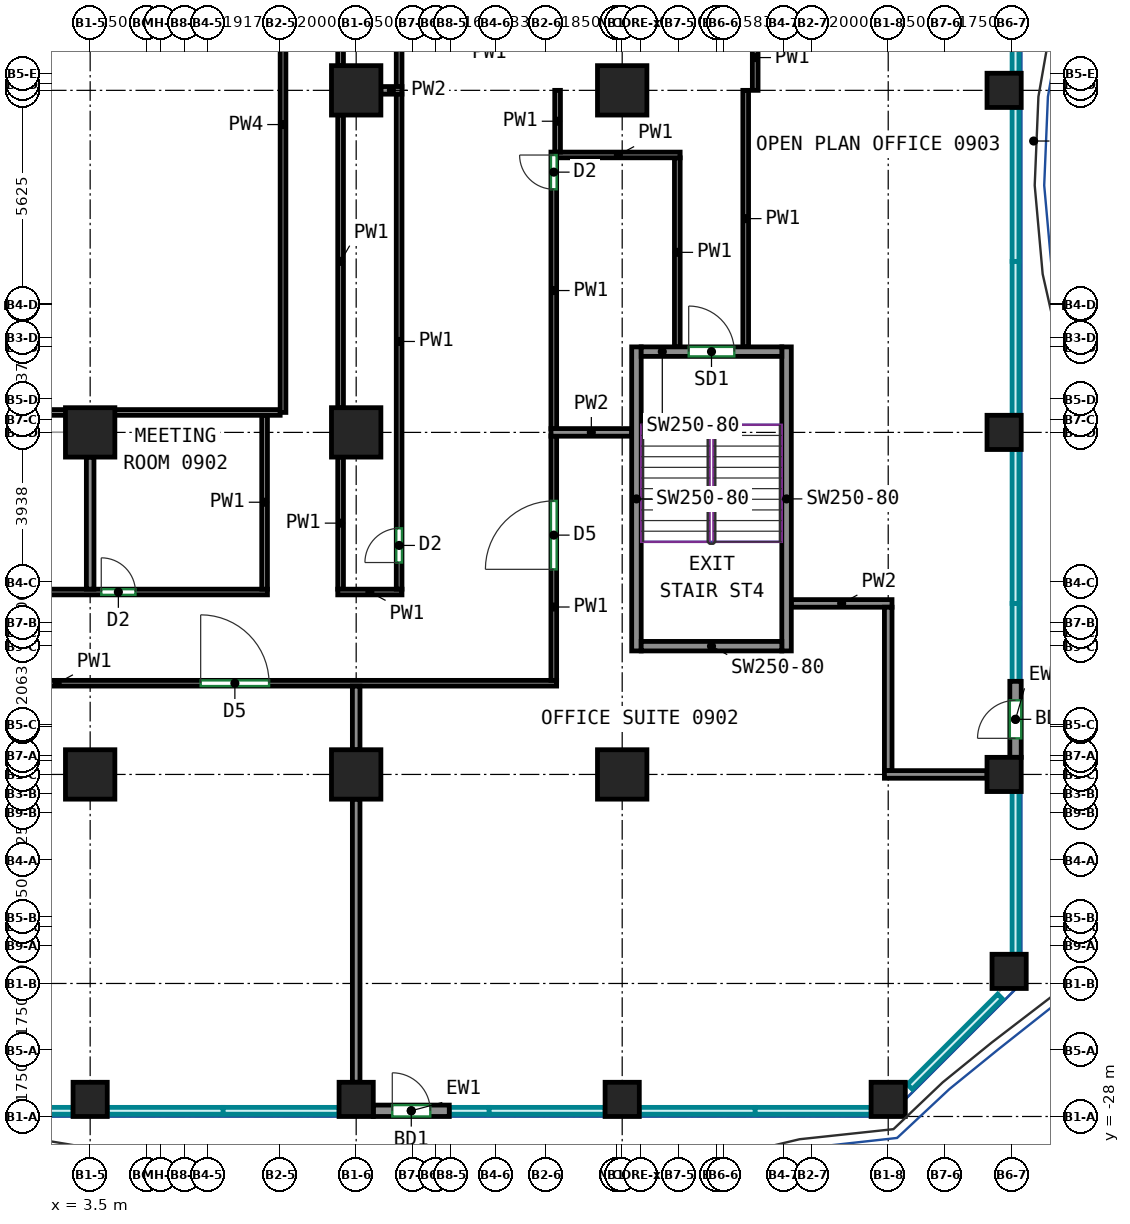
"""IFC4 building model, lengths in metres.
Left out: names, types, materials, properties, quantities, classifications, styles, units other than length and angle.
Written with IfcOpenShell. Run it as: python <this file> out.ifc"""

import sys

from ifc_helpers import new_model, si_unit, direction, frame, frame_2d, origin, origin_2d, place, context, subcontext, project, spatial, rectangle, extrude, source, transform, mapped, element, fill, save


model = new_model("IFC4")
c1 = context("Model", 3, precision=1e-05, world=origin(), true_north=direction((0.0, 1.0)))
c2 = subcontext(c1, "Body", "Model", "MODEL_VIEW")
j1 = project(units=[si_unit("LENGTHUNIT", "METRE"), si_unit("PLANEANGLEUNIT", "RADIAN")], contexts=[c1])
p1 = place(None, origin())
s1 = spatial("IfcSite", under=j1, at=p1, CompositionType="ELEMENT")
p2 = place(p1, origin())
s2 = spatial("IfcBuilding", under=s1, at=p2, CompositionType="ELEMENT")
p3 = place(p2, frame((0.0, 0.0, 43.0)))
s3 = spatial("IfcBuildingStorey", under=s2, at=p3, CompositionType="ELEMENT", Elevation=43.0)
m1 = source(origin(), c2, "Body", "SweptSolid", [
    extrude(rectangle(XDim=0.9, YDim=0.9, at=origin_2d()), origin(), (0.0, 0.0, 1.0), 3.72),
])
p4 = place(p3, frame((3.5, -27.55, 0.0), z_axis=(0.0, 0.0, 1.0), x_axis=(1.0, 0.0, 0.0)))
e1 = element("IfcColumn", 1, at=p4, inside=s3, PredefinedType="COLUMN", context=c2, shape_type="MappedRepresentation", body=[
    mapped(m1, transform((0.0, 0.0, 0.0))),
])
m2 = source(origin(), c2, "Body", "SweptSolid", [
    extrude(rectangle(XDim=1.3, YDim=1.3, at=origin_2d()), origin(), (0.0, 0.0, 1.0), 3.72),
])
for number, where, z_axis, x_axis in (
    (2, (3.5, -19.0, 0.0), (0.0, 0.0, 1.0), (1.0, 0.0, 0.0)),
    (3, (3.5, -10.0, 0.0), (0.0, 0.0, 1.0), (1.0, 0.0, 0.0)),
):
    element("IfcColumn", number, at=place(p3, frame(where, z_axis=z_axis, x_axis=x_axis)), inside=s3, PredefinedType="COLUMN", context=c2, shape_type="MappedRepresentation", body=[
        mapped(m2, transform((0.0, 0.0, 0.0))),
    ])
p5 = place(p3, frame((10.5, -27.55, 0.0), z_axis=(0.0, 0.0, 1.0), x_axis=(1.0, 0.0, 0.0)))
e4 = element("IfcColumn", 4, at=p5, inside=s3, PredefinedType="COLUMN", context=c2, shape_type="MappedRepresentation", body=[
    mapped(m1, transform((0.0, 0.0, 0.0))),
])
for number, where, z_axis, x_axis in (
    (5, (10.5, -19.0, 0.0), (0.0, 0.0, 1.0), (1.0, 0.0, 0.0)),
    (6, (10.5, -10.0, 0.0), (0.0, 0.0, 1.0), (1.0, 0.0, 0.0)),
    (7, (10.5, -1.0, 0.0), (0.0, 0.0, 1.0), (1.0, 0.0, 0.0)),
):
    element("IfcColumn", number, at=place(p3, frame(where, z_axis=z_axis, x_axis=x_axis)), inside=s3, PredefinedType="COLUMN", context=c2, shape_type="MappedRepresentation", body=[
        mapped(m2, transform((0.0, 0.0, 0.0))),
    ])
p6 = place(p3, frame((17.5, -27.55, 0.0), z_axis=(0.0, 0.0, 1.0), x_axis=(1.0, 0.0, 0.0)))
e8 = element("IfcColumn", 8, at=p6, inside=s3, PredefinedType="COLUMN", context=c2, shape_type="MappedRepresentation", body=[
    mapped(m1, transform((0.0, 0.0, 0.0))),
])
for number, where, z_axis, x_axis in (
    (9, (17.5, -19.0, 0.0), (0.0, 0.0, 1.0), (1.0, 0.0, 0.0)),
    (10, (17.5, -1.0, 0.0), (0.0, 0.0, 1.0), (1.0, 0.0, 0.0)),
):
    element("IfcColumn", number, at=place(p3, frame(where, z_axis=z_axis, x_axis=x_axis)), inside=s3, PredefinedType="COLUMN", context=c2, shape_type="MappedRepresentation", body=[
        mapped(m2, transform((0.0, 0.0, 0.0))),
    ])
for number, where, z_axis, x_axis in (
    (11, (24.5, -27.55, 0.0), (0.0, 0.0, 1.0), (1.0, 0.0, 0.0)),
    (12, (27.55, -19.0, 0.0), (0.0, 0.0, 1.0), (1.0, 0.0, 0.0)),
    (13, (27.55, -10.0, 0.0), (0.0, 0.0, 1.0), (1.0, 0.0, 0.0)),
    (14, (27.55, -1.0, 0.0), (0.0, 0.0, 1.0), (1.0, 0.0, 0.0)),
    (15, (27.682, -24.182, 0.0), (0.0, 0.0, 1.0), (1.0, 0.0, 0.0)),
):
    element("IfcColumn", number, at=place(p3, frame(where, z_axis=z_axis, x_axis=x_axis)), inside=s3, PredefinedType="COLUMN", context=c2, shape_type="MappedRepresentation", body=[
        mapped(m1, transform((0.0, 0.0, 0.0))),
    ])
m3 = source(origin(), c2, "Body", "SweptSolid", [
    extrude(rectangle(XDim=8.0, YDim=0.25, at=frame_2d((4.0, 0.0))), origin(), (0.0, 0.0, 1.0), 3.72),
])
for number, where, z_axis, x_axis in (
    (16, (17.875, -15.75, 0.0), (0.0, 0.0, 1.0), (0.0, 1.0, 0.0)),
    (17, (21.825, -15.75, 0.0), (0.0, 0.0, 1.0), (0.0, 1.0, 0.0)),
):
    element("IfcWall", number, at=place(p3, frame(where, z_axis=z_axis, x_axis=x_axis)), inside=s3, PredefinedType="SHEAR", context=c2, shape_type="MappedRepresentation", body=[
        mapped(m3, transform((0.0, 0.0, 0.0))),
    ])
m4 = source(origin(), c2, "Body", "SweptSolid", [
    extrude(rectangle(XDim=3.7, YDim=0.25, at=frame_2d((1.85, 0.0))), origin(), (0.0, 0.0, 1.0), 3.72),
])
p7 = place(p3, frame((18.0, -15.625, 0.0), z_axis=(0.0, 0.0, 1.0), x_axis=(1.0, 0.0, 0.0)))
e18 = element("IfcWall", 18, at=p7, inside=s3, PredefinedType="SHEAR", context=c2, shape_type="MappedRepresentation", body=[
    mapped(m4, transform((0.0, 0.0, 0.0))),
])
p8 = place(p3, frame((18.0, -7.875, 0.0), z_axis=(0.0, 0.0, 1.0), x_axis=(1.0, 0.0, 0.0)))
e19 = element("IfcWall", 19, at=p8, inside=s3, PredefinedType="SHEAR", context=c2, shape_type="MappedRepresentation", body=[
    mapped(m4, transform((0.0, 0.0, 0.0))),
])
p9 = place(p8, frame((1.25, 0.0, 0.0)))
e20 = element("IfcOpeningElement", 20, at=p9, cuts=e19, PredefinedType="OPENING", context=c2, shape_type="SweptSolid", body=[
    extrude(rectangle(XDim=1.2, YDim=2.1, at=frame_2d((0.6, 1.05))), frame((0.0, 0.135, 0.0), z_axis=(0.0, -1.0, 0.0), x_axis=(1.0, 0.0, 0.0)), (0.0, 0.0, 1.0), 0.27),
])
m5 = source(origin(), c2, "Body", "SweptSolid", [
    extrude(rectangle(XDim=2.0, YDim=0.3, at=frame_2d((1.0, 0.0))), origin(), (0.0, 0.0, 1.0), 3.72),
])
p10 = place(p3, frame((10.95, -27.85, 0.0), z_axis=(0.0, 0.0, 1.0), x_axis=(1.0, 0.0, 0.0)))
e21 = element("IfcWall", 21, at=p10, inside=s3, PredefinedType="SOLIDWALL", context=c2, shape_type="MappedRepresentation", body=[
    mapped(m5, transform((0.0, 0.0, 0.0))),
])
p11 = place(p10, frame((0.5, 0.0, 0.0)))
e22 = element("IfcOpeningElement", 22, at=p11, cuts=e21, PredefinedType="OPENING", context=c2, shape_type="SweptSolid", body=[
    extrude(rectangle(XDim=1.0, YDim=2.1, at=frame_2d((0.5, 1.05))), frame((0.0, 0.16, 0.0), z_axis=(0.0, -1.0, 0.0), x_axis=(1.0, 0.0, 0.0)), (0.0, 0.0, 1.0), 0.32),
])
p12 = place(p3, frame((27.85, -18.55, 0.0), z_axis=(0.0, 0.0, 1.0), x_axis=(0.0, 1.0, 0.0)))
e23 = element("IfcWall", 23, at=p12, inside=s3, PredefinedType="SOLIDWALL", context=c2, shape_type="MappedRepresentation", body=[
    mapped(m5, transform((0.0, 0.0, 0.0))),
])
p13 = place(p12, frame((0.5, 0.0, 0.0)))
e24 = element("IfcOpeningElement", 24, at=p13, cuts=e23, PredefinedType="OPENING", context=c2, shape_type="SweptSolid", body=[
    extrude(rectangle(XDim=1.0, YDim=2.1, at=frame_2d((0.5, 1.05))), frame((0.0, 0.16, 0.0), z_axis=(0.0, -1.0, 0.0), x_axis=(1.0, 0.0, 0.0)), (0.0, 0.0, 1.0), 0.32),
])
p14 = place(p3, frame((-7.805, -14.2, 0.0), z_axis=(0.0, 0.0, 1.0), x_axis=(1.0, 0.0, 0.0)))
e25 = element("IfcWall", 25, at=p14, inside=s3, PredefinedType="PARTITIONING", context=c2, shape_type="SweptSolid", body=[
    extrude(rectangle(XDim=15.97, YDim=0.15, at=frame_2d((7.985, 0.0))), origin(), (0.0, 0.0, 1.0), 3.72),
])
p15 = place(p14, frame((11.597, 0.0, 0.0)))
e26 = element("IfcOpeningElement", 26, at=p15, cuts=e25, PredefinedType="OPENING", context=c2, shape_type="SweptSolid", body=[
    extrude(rectangle(XDim=0.9, YDim=2.1, at=frame_2d((0.45, 1.05))), frame((0.0, 0.085, 0.0), z_axis=(0.0, -1.0, 0.0), x_axis=(1.0, 0.0, 0.0)), (0.0, 0.0, 1.0), 0.17),
])
p16 = place(p3, frame((8.09, -14.125, 0.0), z_axis=(0.0, 0.0, 1.0), x_axis=(0.0, 1.0, 0.0)))
e27 = element("IfcWall", 27, at=p16, inside=s3, PredefinedType="PARTITIONING", context=c2, shape_type="SweptSolid", body=[
    extrude(rectangle(XDim=4.575, YDim=0.15, at=frame_2d((2.288, 0.0))), origin(), (0.0, 0.0, 1.0), 3.72),
])
p17 = place(p3, frame((10.09, -9.35, 0.0), z_axis=(0.0, 0.0, 1.0), x_axis=(0.0, 1.0, 0.0)))
e28 = element("IfcWall", 28, at=p17, inside=s3, PredefinedType="PARTITIONING", context=c2, shape_type="SweptSolid", body=[
    extrude(rectangle(XDim=7.7, YDim=0.15, at=frame_2d((3.85, 0.0))), origin(), (0.0, 0.0, 1.0), 3.72),
])
p18 = place(p3, frame((10.09, -14.125, 0.0), z_axis=(0.0, 0.0, 1.0), x_axis=(0.0, 1.0, 0.0)))
e29 = element("IfcWall", 29, at=p18, inside=s3, PredefinedType="PARTITIONING", context=c2, shape_type="SweptSolid", body=[
    extrude(rectangle(XDim=3.475, YDim=0.15, at=frame_2d((1.738, 0.0))), origin(), (0.0, 0.0, 1.0), 3.72),
])
p19 = place(p3, frame((10.015, -14.2, 0.0), z_axis=(0.0, 0.0, 1.0), x_axis=(1.0, 0.0, 0.0)))
e30 = element("IfcWall", 30, at=p19, inside=s3, PredefinedType="PARTITIONING", context=c2, shape_type="SweptSolid", body=[
    extrude(rectangle(XDim=1.69, YDim=0.15, at=frame_2d((0.845, 0.0))), origin(), (0.0, 0.0, 1.0), 3.72),
])
p20 = place(p3, frame((11.63, -14.125, 0.0), z_axis=(0.0, 0.0, 1.0), x_axis=(0.0, 1.0, 0.0)))
e31 = element("IfcWall", 31, at=p20, inside=s3, PredefinedType="PARTITIONING", context=c2, shape_type="SweptSolid", body=[
    extrude(rectangle(XDim=13.035, YDim=0.15, at=frame_2d((6.518, 0.0))), origin(), (0.0, 0.0, 1.0), 3.72),
])
p21 = place(p20, frame((0.701, 0.0, 0.0)))
e32 = element("IfcOpeningElement", 32, at=p21, cuts=e31, PredefinedType="OPENING", context=c2, shape_type="SweptSolid", body=[
    extrude(rectangle(XDim=0.9, YDim=2.1, at=frame_2d((0.45, 1.05))), frame((0.0, 0.085, 0.0), z_axis=(0.0, -1.0, 0.0), x_axis=(1.0, 0.0, 0.0)), (0.0, 0.0, 1.0), 0.17),
])
p22 = place(p3, frame((10.09, -0.35, 0.0), z_axis=(0.0, 0.0, 1.0), x_axis=(0.0, 1.0, 0.0)))
e33 = element("IfcWall", 33, at=p22, inside=s3, PredefinedType="PARTITIONING", context=c2, shape_type="SweptSolid", body=[
    extrude(rectangle(XDim=8.35, YDim=0.15, at=frame_2d((4.175, 0.0))), origin(), (0.0, 0.0, 1.0), 3.72),
])
p23 = place(p22, frame((4.329, 0.0, 0.0)))
e34 = element("IfcOpeningElement", 34, at=p23, cuts=e33, PredefinedType="OPENING", context=c2, shape_type="SweptSolid", body=[
    extrude(rectangle(XDim=0.9, YDim=2.1, at=frame_2d((0.45, 1.05))), frame((0.0, 0.085, 0.0), z_axis=(0.0, -1.0, 0.0), x_axis=(1.0, 0.0, 0.0)), (0.0, 0.0, 1.0), 0.17),
])
p24 = place(p3, frame((11.63, -0.91, 0.0), z_axis=(0.0, 0.0, 1.0), x_axis=(0.0, 1.0, 0.0)))
e35 = element("IfcWall", 35, at=p24, inside=s3, PredefinedType="PARTITIONING", context=c2, shape_type="SweptSolid", body=[
    extrude(rectangle(XDim=6.26, YDim=0.15, at=frame_2d((3.13, 0.0))), origin(), (0.0, 0.0, 1.0), 3.72),
])
p25 = place(p3, frame((-10.51, -16.6, 0.0), z_axis=(0.0, 0.0, 1.0), x_axis=(1.0, 0.0, 0.0)))
e36 = element("IfcWall", 36, at=p25, inside=s3, PredefinedType="PARTITIONING", context=c2, shape_type="SweptSolid", body=[
    extrude(rectangle(XDim=26.285, YDim=0.15, at=frame_2d((13.143, 0.0))), origin(), (0.0, 0.0, 1.0), 3.72),
])
p26 = place(p25, frame((16.918, 0.0, 0.0)))
e37 = element("IfcOpeningElement", 37, at=p26, cuts=e36, PredefinedType="OPENING", context=c2, shape_type="SweptSolid", body=[
    extrude(rectangle(XDim=1.8, YDim=2.1, at=frame_2d((0.9, 1.05))), frame((0.0, 0.085, 0.0), z_axis=(0.0, -1.0, 0.0), x_axis=(1.0, 0.0, 0.0)), (0.0, 0.0, 1.0), 0.17),
])
p27 = place(p3, frame((15.7, -16.525, 0.0), z_axis=(0.0, 0.0, 1.0), x_axis=(0.0, 1.0, 0.0)))
e38 = element("IfcWall", 38, at=p27, inside=s3, PredefinedType="PARTITIONING", context=c2, shape_type="SweptSolid", body=[
    extrude(rectangle(XDim=6.435, YDim=0.15, at=frame_2d((3.217, 0.0))), origin(), (0.0, 0.0, 1.0), 3.72),
])
p28 = place(p27, frame((2.922, 0.0, 0.0)))
e39 = element("IfcOpeningElement", 39, at=p28, cuts=e38, PredefinedType="OPENING", context=c2, shape_type="SweptSolid", body=[
    extrude(rectangle(XDim=1.8, YDim=2.1, at=frame_2d((0.9, 1.05))), frame((0.0, 0.085, 0.0), z_axis=(0.0, -1.0, 0.0), x_axis=(1.0, 0.0, 0.0)), (0.0, 0.0, 1.0), 0.17),
])
p29 = place(p3, frame((18.95, -2.775, 0.0), z_axis=(0.0, 0.0, 1.0), x_axis=(0.0, -1.0, 0.0)))
e40 = element("IfcWall", 40, at=p29, inside=s3, PredefinedType="PARTITIONING", context=c2, shape_type="SweptSolid", body=[
    extrude(rectangle(XDim=4.975, YDim=0.15, at=frame_2d((2.488, 0.0))), origin(), (0.0, 0.0, 1.0), 3.72),
])
p30 = place(p3, frame((15.775, -2.7, 0.0), z_axis=(0.0, 0.0, 1.0), x_axis=(1.0, 0.0, 0.0)))
e41 = element("IfcWall", 41, at=p30, inside=s3, PredefinedType="PARTITIONING", context=c2, shape_type="SweptSolid", body=[
    extrude(rectangle(XDim=3.25, YDim=0.15, at=frame_2d((1.625, 0.0))), origin(), (0.0, 0.0, 1.0), 3.72),
])
p31 = place(p3, frame((15.8, -2.625, 0.0), z_axis=(0.0, 0.0, 1.0), x_axis=(0.0, 1.0, 0.0)))
e42 = element("IfcWall", 42, at=p31, inside=s3, PredefinedType="PARTITIONING", context=c2, shape_type="SweptSolid", body=[
    extrude(rectangle(XDim=1.625, YDim=0.15, at=frame_2d((0.812, 0.0))), origin(), (0.0, 0.0, 1.0), 3.72),
])
p32 = place(p3, frame((15.7, -9.91, 0.0), z_axis=(0.0, 0.0, 1.0), x_axis=(0.0, 1.0, 0.0)))
e43 = element("IfcWall", 43, at=p32, inside=s3, PredefinedType="PARTITIONING", context=c2, shape_type="SweptSolid", body=[
    extrude(rectangle(XDim=7.285, YDim=0.15, at=frame_2d((3.643, 0.0))), origin(), (0.0, 0.0, 1.0), 3.72),
])
p33 = place(p32, frame((6.308, 0.0, 0.0)))
e44 = element("IfcOpeningElement", 44, at=p33, cuts=e43, PredefinedType="OPENING", context=c2, shape_type="SweptSolid", body=[
    extrude(rectangle(XDim=0.9, YDim=2.1, at=frame_2d((0.45, 1.05))), frame((0.0, 0.085, 0.0), z_axis=(0.0, -1.0, 0.0), x_axis=(1.0, 0.0, 0.0)), (0.0, 0.0, 1.0), 0.17),
])
p34 = place(p3, frame((21.0, -1.0, 0.0), z_axis=(0.0, 0.0, 1.0), x_axis=(0.0, 1.0, 0.0)))
e45 = element("IfcWall", 45, at=p34, inside=s3, PredefinedType="PARTITIONING", context=c2, shape_type="SweptSolid", body=[
    extrude(rectangle(XDim=1.725, YDim=0.15, at=frame_2d((0.863, 0.0))), origin(), (0.0, 0.0, 1.0), 3.72),
])
p35 = place(p3, frame((20.75, -7.75, 0.0), z_axis=(0.0, 0.0, 1.0), x_axis=(0.0, 1.0, 0.0)))
e46 = element("IfcWall", 46, at=p35, inside=s3, PredefinedType="PARTITIONING", context=c2, shape_type="SweptSolid", body=[
    extrude(rectangle(XDim=6.75, YDim=0.15, at=frame_2d((3.375, 0.0))), origin(), (0.0, 0.0, 1.0), 3.72),
])
p36 = place(p3, frame((3.5, -14.124, 0.0), z_axis=(0.0, 0.0, 1.0), x_axis=(0.0, 1.0, 0.0)))
e47 = element("IfcWall", 47, at=p36, inside=s3, PredefinedType="PARTITIONING", context=c2, shape_type="SweptSolid", body=[
    extrude(rectangle(XDim=3.474, YDim=0.2, at=frame_2d((1.737, 0.0))), origin(), (0.0, 0.0, 1.0), 3.07),
])
p37 = place(p3, frame((11.15, -1.0, 0.0), z_axis=(0.0, 0.0, 1.0), x_axis=(1.0, 0.0, 0.0)))
e48 = element("IfcWall", 48, at=p37, inside=s3, PredefinedType="PARTITIONING", context=c2, shape_type="SweptSolid", body=[
    extrude(rectangle(XDim=0.554, YDim=0.2, at=frame_2d((0.277, 0.0))), origin(), (0.0, 0.0, 1.0), 3.72),
])
p38 = place(p3, frame((10.5, -18.35, 0.0), z_axis=(0.0, 0.0, 1.0), x_axis=(0.0, 1.0, 0.0)))
e49 = element("IfcWall", 49, at=p38, inside=s3, PredefinedType="PARTITIONING", context=c2, shape_type="SweptSolid", body=[
    extrude(rectangle(XDim=1.674, YDim=0.2, at=frame_2d((0.837, 0.0))), origin(), (0.0, 0.0, 1.0), 3.07),
])
p39 = place(p3, frame((10.5, -27.1, 0.0), z_axis=(0.0, 0.0, 1.0), x_axis=(0.0, 1.0, 0.0)))
e50 = element("IfcWall", 50, at=p39, inside=s3, PredefinedType="PARTITIONING", context=c2, shape_type="SweptSolid", body=[
    extrude(rectangle(XDim=7.45, YDim=0.2, at=frame_2d((3.725, 0.0))), origin(), (0.0, 0.0, 1.0), 3.07),
])
p40 = place(p3, frame((17.75, -10.0, 0.0), z_axis=(0.0, 0.0, 1.0), x_axis=(-1.0, 0.0, 0.0)))
e51 = element("IfcWall", 51, at=p40, inside=s3, PredefinedType="PARTITIONING", context=c2, shape_type="SweptSolid", body=[
    extrude(rectangle(XDim=2.124, YDim=0.2, at=frame_2d((1.062, 0.0))), origin(), (0.0, 0.0, 1.0), 3.72),
])
p41 = place(p3, frame((24.6, -14.5, 0.0), z_axis=(0.0, 0.0, 1.0), x_axis=(-1.0, 0.0, 0.0)))
e52 = element("IfcWall", 52, at=p41, inside=s3, PredefinedType="PARTITIONING", context=c2, shape_type="SweptSolid", body=[
    extrude(rectangle(XDim=2.65, YDim=0.2, at=frame_2d((1.325, 0.0))), origin(), (0.0, 0.0, 1.0), 3.72),
])
p42 = place(p3, frame((24.5, -18.9, 0.0), z_axis=(0.0, 0.0, 1.0), x_axis=(0.0, 1.0, 0.0)))
e53 = element("IfcWall", 53, at=p42, inside=s3, PredefinedType="PARTITIONING", context=c2, shape_type="SweptSolid", body=[
    extrude(rectangle(XDim=4.3, YDim=0.2, at=frame_2d((2.15, 0.0))), origin(), (0.0, 0.0, 1.0), 3.07),
])
p43 = place(p3, frame((27.1, -19.0, 0.0), z_axis=(0.0, 0.0, 1.0), x_axis=(-1.0, 0.0, 0.0)))
e54 = element("IfcWall", 54, at=p43, inside=s3, PredefinedType="PARTITIONING", context=c2, shape_type="SweptSolid", body=[
    extrude(rectangle(XDim=2.7, YDim=0.2, at=frame_2d((1.35, 0.0))), origin(), (0.0, 0.0, 1.0), 3.07),
])
p44 = place(p3, frame((8.5, -9.475, 0.0), z_axis=(0.0, 0.0, 1.0), x_axis=(-1.0, 0.0, 0.0)))
e55 = element("IfcWall", 55, at=p44, inside=s3, PredefinedType="PARTITIONING", context=c2, shape_type="SweptSolid", body=[
    extrude(rectangle(XDim=15.075, YDim=0.15, at=frame_2d((7.538, 0.0))), origin(), (0.0, 0.0, 1.0), 3.72),
])
p45 = place(p3, frame((8.575, 5.675, 0.0), z_axis=(0.0, 0.0, 1.0), x_axis=(0.0, -1.0, 0.0)))
e56 = element("IfcWall", 56, at=p45, inside=s3, PredefinedType="PARTITIONING", context=c2, shape_type="SweptSolid", body=[
    extrude(rectangle(XDim=15.15, YDim=0.15, at=frame_2d((7.575, 0.0))), origin(), (0.0, 0.0, 1.0), 3.72),
])
p46 = place(p11, origin())
e57 = element("IfcDoor", 57, at=p46, inside=s3, OperationType="SINGLE_SWING_LEFT", PredefinedType="DOOR", context=c2, shape_type="SweptSolid", body=[
    extrude(rectangle(XDim=1.0, YDim=2.1, at=frame_2d((0.5, 1.05))), frame((0.0, 0.025, 0.0), z_axis=(0.0, -1.0, 0.0), x_axis=(1.0, 0.0, 0.0)), (0.0, 0.0, 1.0), 0.05),
])
fill(e22, e57)
p47 = place(p13, origin())
e58 = element("IfcDoor", 58, at=p47, inside=s3, OperationType="SINGLE_SWING_LEFT", PredefinedType="DOOR", context=c2, shape_type="SweptSolid", body=[
    extrude(rectangle(XDim=1.0, YDim=2.1, at=frame_2d((0.5, 1.05))), frame((0.0, 0.025, 0.0), z_axis=(0.0, -1.0, 0.0), x_axis=(1.0, 0.0, 0.0)), (0.0, 0.0, 1.0), 0.05),
])
fill(e24, e58)
p48 = place(p9, origin())
e59 = element("IfcDoor", 59, at=p48, inside=s3, OperationType="DOUBLE_DOOR_SINGLE_SWING", PredefinedType="DOOR", context=c2, shape_type="SweptSolid", body=[
    extrude(rectangle(XDim=1.2, YDim=2.1, at=frame_2d((0.6, 1.05))), frame((0.0, 0.025, 0.0), z_axis=(0.0, -1.0, 0.0), x_axis=(1.0, 0.0, 0.0)), (0.0, 0.0, 1.0), 0.05),
])
fill(e20, e59)
p49 = place(p26, origin())
e60 = element("IfcDoor", 60, at=p49, inside=s3, OperationType="DOUBLE_DOOR_SINGLE_SWING", PredefinedType="DOOR", context=c2, shape_type="SweptSolid", body=[
    extrude(rectangle(XDim=1.8, YDim=2.1, at=frame_2d((0.9, 1.05))), frame((0.0, 0.025, 0.0), z_axis=(0.0, -1.0, 0.0), x_axis=(1.0, 0.0, 0.0)), (0.0, 0.0, 1.0), 0.05),
])
fill(e37, e60)
p50 = place(p15, origin())
e61 = element("IfcDoor", 61, at=p50, inside=s3, OperationType="SINGLE_SWING_LEFT", PredefinedType="DOOR", context=c2, shape_type="SweptSolid", body=[
    extrude(rectangle(XDim=0.9, YDim=2.1, at=frame_2d((0.45, 1.05))), frame((0.0, 0.025, 0.0), z_axis=(0.0, -1.0, 0.0), x_axis=(1.0, 0.0, 0.0)), (0.0, 0.0, 1.0), 0.05),
])
fill(e26, e61)
p51 = place(p21, origin())
e62 = element("IfcDoor", 62, at=p51, inside=s3, OperationType="SINGLE_SWING_LEFT", PredefinedType="DOOR", context=c2, shape_type="SweptSolid", body=[
    extrude(rectangle(XDim=0.9, YDim=2.1, at=frame_2d((0.45, 1.05))), frame((0.0, 0.025, 0.0), z_axis=(0.0, -1.0, 0.0), x_axis=(1.0, 0.0, 0.0)), (0.0, 0.0, 1.0), 0.05),
])
fill(e32, e62)
p52 = place(p28, origin())
e63 = element("IfcDoor", 63, at=p52, inside=s3, OperationType="DOUBLE_DOOR_SINGLE_SWING", PredefinedType="DOOR", context=c2, shape_type="SweptSolid", body=[
    extrude(rectangle(XDim=1.8, YDim=2.1, at=frame_2d((0.9, 1.05))), frame((0.0, 0.025, 0.0), z_axis=(0.0, -1.0, 0.0), x_axis=(1.0, 0.0, 0.0)), (0.0, 0.0, 1.0), 0.05),
])
fill(e39, e63)
p53 = place(p33, origin())
e64 = element("IfcDoor", 64, at=p53, inside=s3, OperationType="SINGLE_SWING_RIGHT", PredefinedType="DOOR", context=c2, shape_type="SweptSolid", body=[
    extrude(rectangle(XDim=0.9, YDim=2.1, at=frame_2d((0.45, 1.05))), frame((0.0, 0.025, 0.0), z_axis=(0.0, -1.0, 0.0), x_axis=(1.0, 0.0, 0.0)), (0.0, 0.0, 1.0), 0.05),
])
fill(e44, e64)
save(model, sys.argv[1])
